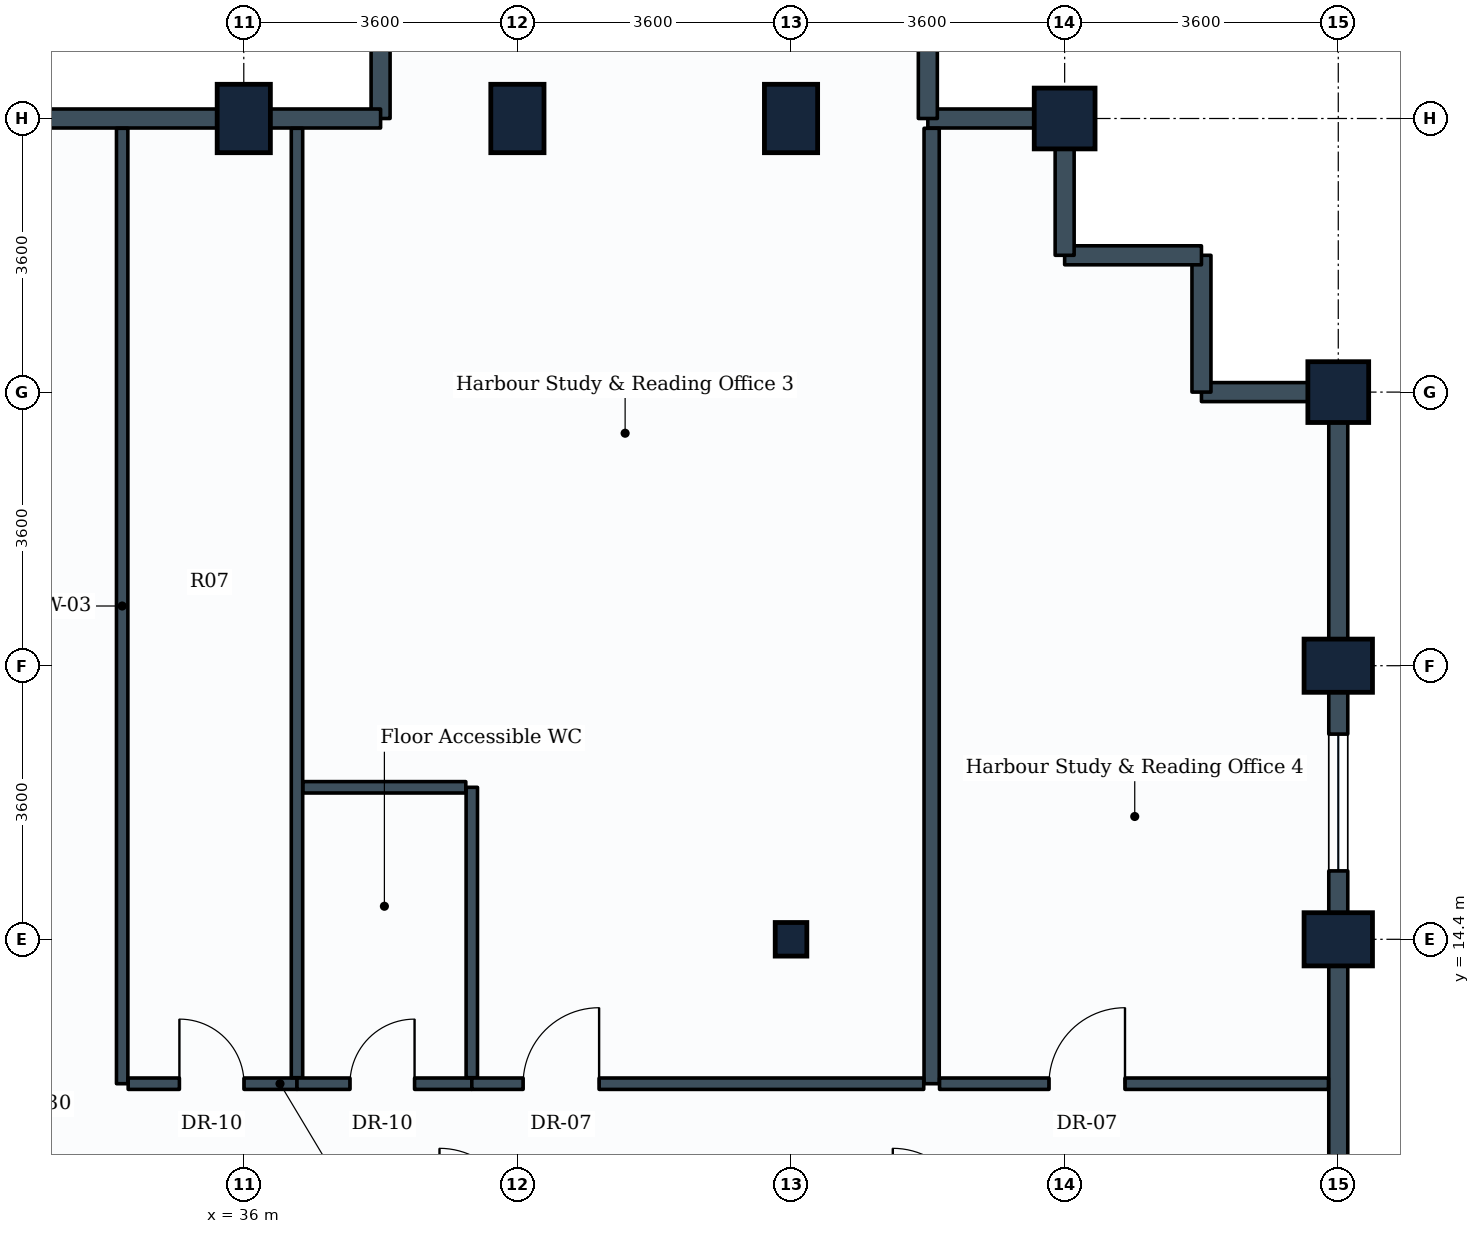
"""IFC4 building model, lengths in metres.
Left out: names, types, materials, properties, quantities, classifications, styles, units other than length and angle.
Written with IfcOpenShell. Run it as: python <this file> out.ifc"""

import sys

from ifc_helpers import new_model, si_unit, direction, frame, frame_2d, origin, origin_2d, place, context, subcontext, project, spatial, rectangle, i_section, extrude, element, fill, save


model = new_model("IFC4")
c1 = context("Model", 3, precision=1e-05, world=origin(), true_north=direction((0.0, 1.0)))
c2 = subcontext(c1, "Body", "Model", "MODEL_VIEW")
j1 = project(units=[si_unit("LENGTHUNIT", "METRE"), si_unit("PLANEANGLEUNIT", "RADIAN")], contexts=[c1])
p1 = place(None, origin())
s1 = spatial("IfcSite", under=j1, at=p1, CompositionType="ELEMENT")
p2 = place(p1, origin())
s2 = spatial("IfcBuilding", under=s1, at=p2, CompositionType="ELEMENT")
p3 = place(p2, frame((0.0, 0.0, 182.4)))
s3 = spatial("IfcBuildingStorey", under=s2, at=p3, CompositionType="ELEMENT", Elevation=182.4)
for number, where, z_axis, x_axis in (
    (1, (36.0, 25.2, 0.0), (0.0, 0.0, 1.0), (1.0, 0.0, 0.0)),
    (2, (39.6, 25.2, 0.0), (0.0, 0.0, 1.0), (1.0, 0.0, 0.0)),
):
    element("IfcColumn", number, at=place(p3, frame(where, z_axis=z_axis, x_axis=x_axis)), inside=s3, PredefinedType="COLUMN", context=c2, shape_type="SweptSolid", body=[
        extrude(rectangle(XDim=0.7, YDim=0.9, at=origin_2d()), origin(), (0.0, 0.0, 1.0), 3.8),
    ])
p4 = place(p3, frame((43.2, 14.4, 0.0), z_axis=(0.0, 0.0, 1.0), x_axis=(1.0, 0.0, 0.0)))
e3 = element("IfcColumn", 3, at=p4, inside=s3, PredefinedType="COLUMN", context=c2, shape_type="SweptSolid", body=[
    extrude(i_section(OverallWidth=0.416, OverallDepth=0.442, WebThickness=0.025, FlangeThickness=0.041, FilletRadius=0.015, at=origin_2d()), origin(), (0.0, 0.0, 1.0), 3.8),
])
p5 = place(p3, frame((43.2, 25.2, 0.0), z_axis=(0.0, 0.0, 1.0), x_axis=(1.0, 0.0, 0.0)))
e4 = element("IfcColumn", 4, at=p5, inside=s3, PredefinedType="COLUMN", context=c2, shape_type="SweptSolid", body=[
    extrude(rectangle(XDim=0.7, YDim=0.9, at=origin_2d()), origin(), (0.0, 0.0, 1.0), 3.8),
])
p6 = place(p3, frame((46.8, 25.2, 0.0), z_axis=(0.0, 0.0, 1.0), x_axis=(1.0, 0.0, 0.0)))
e5 = element("IfcColumn", 5, at=p6, inside=s3, PredefinedType="COLUMN", context=c2, shape_type="SweptSolid", body=[
    extrude(rectangle(XDim=0.8, YDim=0.8, at=origin_2d()), origin(), (0.0, 0.0, 1.0), 3.8),
])
for number, where, z_axis, x_axis in (
    (6, (50.4, 14.4, 0.0), (0.0, 0.0, 1.0), (0.0, 1.0, 0.0)),
    (7, (50.4, 18.0, 0.0), (0.0, 0.0, 1.0), (0.0, 1.0, 0.0)),
):
    element("IfcColumn", number, at=place(p3, frame(where, z_axis=z_axis, x_axis=x_axis)), inside=s3, PredefinedType="COLUMN", context=c2, shape_type="SweptSolid", body=[
        extrude(rectangle(XDim=0.7, YDim=0.9, at=origin_2d()), origin(), (0.0, 0.0, 1.0), 3.8),
    ])
p7 = place(p3, frame((50.4, 21.6, 0.0), z_axis=(0.0, 0.0, 1.0), x_axis=(0.0, 1.0, 0.0)))
e8 = element("IfcColumn", 8, at=p7, inside=s3, PredefinedType="COLUMN", context=c2, shape_type="SweptSolid", body=[
    extrude(rectangle(XDim=0.8, YDim=0.8, at=origin_2d()), origin(), (0.0, 0.0, 1.0), 3.8),
])
p8 = place(p3, frame((50.4, 14.4, 0.0), z_axis=(0.0, 0.0, 1.0), x_axis=(0.0, -1.0, 0.0)))
e9 = element("IfcWall", 9, at=p8, inside=s3, PredefinedType="STANDARD", context=c2, shape_type="SweptSolid", body=[
    extrude(rectangle(XDim=3.6, YDim=0.25, at=frame_2d((1.8, 0.0))), origin(), (0.0, 0.0, 1.0), 2.93),
])
p9 = place(p3, frame((50.4, 18.0, 0.0), z_axis=(0.0, 0.0, 1.0), x_axis=(0.0, -1.0, 0.0)))
e10 = element("IfcWall", 10, at=p9, inside=s3, PredefinedType="STANDARD", context=c2, shape_type="SweptSolid", body=[
    extrude(rectangle(XDim=3.6, YDim=0.25, at=frame_2d((1.8, 0.0))), origin(), (0.0, 0.0, 1.0), 2.93),
])
p10 = place(p9, frame((0.9, 0.0, 0.85)))
e11 = element("IfcOpeningElement", 11, at=p10, cuts=e10, PredefinedType="OPENING", context=c2, shape_type="SweptSolid", body=[
    extrude(rectangle(XDim=1.8, YDim=1.35, at=frame_2d((0.9, 0.675))), frame((0.0, 0.135, 0.0), z_axis=(0.0, -1.0, 0.0), x_axis=(1.0, 0.0, 0.0)), (0.0, 0.0, 1.0), 0.27),
])
p11 = place(p3, frame((50.4, 21.6, 0.0), z_axis=(0.0, 0.0, 1.0), x_axis=(0.0, -1.0, 0.0)))
e12 = element("IfcWall", 12, at=p11, inside=s3, PredefinedType="STANDARD", context=c2, shape_type="SweptSolid", body=[
    extrude(rectangle(XDim=3.6, YDim=0.25, at=frame_2d((1.8, 0.0))), origin(), (0.0, 0.0, 1.0), 2.93),
])
p12 = place(p3, frame((48.6, 21.6, 0.0), z_axis=(0.0, 0.0, 1.0), x_axis=(1.0, 0.0, 0.0)))
e13 = element("IfcWall", 13, at=p12, inside=s3, PredefinedType="STANDARD", context=c2, shape_type="SweptSolid", body=[
    extrude(rectangle(XDim=1.8, YDim=0.25, at=frame_2d((0.9, 0.0))), origin(), (0.0, 0.0, 1.0), 2.93),
])
p13 = place(p3, frame((48.6, 23.4, 0.0), z_axis=(0.0, 0.0, 1.0), x_axis=(0.0, -1.0, 0.0)))
e14 = element("IfcWall", 14, at=p13, inside=s3, PredefinedType="STANDARD", context=c2, shape_type="SweptSolid", body=[
    extrude(rectangle(XDim=1.8, YDim=0.25, at=frame_2d((0.9, 0.0))), origin(), (0.0, 0.0, 1.0), 3.535),
])
p14 = place(p3, frame((46.8, 23.4, 0.0), z_axis=(0.0, 0.0, 1.0), x_axis=(1.0, 0.0, 0.0)))
e15 = element("IfcWall", 15, at=p14, inside=s3, PredefinedType="STANDARD", context=c2, shape_type="SweptSolid", body=[
    extrude(rectangle(XDim=1.8, YDim=0.25, at=frame_2d((0.9, 0.0))), origin(), (0.0, 0.0, 1.0), 3.535),
])
for number, where, z_axis, x_axis in (
    (16, (46.8, 25.2, 0.0), (0.0, 0.0, 1.0), (0.0, -1.0, 0.0)),
    (17, (45.0, 25.2, 0.0), (0.0, 0.0, 1.0), (1.0, 0.0, 0.0)),
):
    element("IfcWall", number, at=place(p3, frame(where, z_axis=z_axis, x_axis=x_axis)), inside=s3, PredefinedType="STANDARD", context=c2, shape_type="SweptSolid", body=[
        extrude(rectangle(XDim=1.8, YDim=0.25, at=frame_2d((0.9, 0.0))), origin(), (0.0, 0.0, 1.0), 2.93),
    ])
for number, where, z_axis, x_axis in (
    (18, (45.0, 27.3, 0.0), (0.0, 0.0, 1.0), (0.0, -1.0, 0.0)),
    (19, (37.8, 27.3, 0.0), (0.0, 0.0, 1.0), (0.0, -1.0, 0.0)),
):
    element("IfcWall", number, at=place(p3, frame(where, z_axis=z_axis, x_axis=x_axis)), inside=s3, PredefinedType="STANDARD", context=c2, shape_type="SweptSolid", body=[
        extrude(rectangle(XDim=2.1, YDim=0.25, at=frame_2d((1.05, 0.0))), origin(), (0.0, 0.0, 1.0), 2.93),
    ])
p15 = place(p3, frame((36.0, 25.2, 0.0), z_axis=(0.0, 0.0, 1.0), x_axis=(1.0, 0.0, 0.0)))
e20 = element("IfcWall", 20, at=p15, inside=s3, PredefinedType="STANDARD", context=c2, shape_type="SweptSolid", body=[
    extrude(rectangle(XDim=1.8, YDim=0.25, at=frame_2d((0.9, 0.0))), origin(), (0.0, 0.0, 1.0), 2.93),
])
p16 = place(p3, frame((32.4, 25.2, 0.0), z_axis=(0.0, 0.0, 1.0), x_axis=(1.0, 0.0, 0.0)))
e21 = element("IfcWall", 21, at=p16, inside=s3, PredefinedType="STANDARD", context=c2, shape_type="SweptSolid", body=[
    extrude(rectangle(XDim=3.6, YDim=0.25, at=frame_2d((1.8, 0.0))), origin(), (0.0, 0.0, 1.0), 2.93),
])
p17 = place(p3, frame((34.4, 12.5, 0.0), z_axis=(0.0, 0.0, 1.0), x_axis=(0.0, 1.0, 0.0)))
e22 = element("IfcWall", 22, at=p17, inside=s3, PredefinedType="PARTITIONING", context=c2, shape_type="SweptSolid", body=[
    extrude(rectangle(XDim=12.571, YDim=0.15, at=frame_2d((6.286, 0.0))), origin(), (0.0, 0.0, 1.0), 2.93),
])
p18 = place(p3, frame((34.479, 12.5, 0.0), z_axis=(0.0, 0.0, 1.0), x_axis=(1.0, 0.0, 0.0)))
e23 = element("IfcWall", 23, at=p18, inside=s3, PredefinedType="PARTITIONING", context=c2, shape_type="SweptSolid", body=[
    extrude(rectangle(XDim=2.221, YDim=0.15, at=frame_2d((1.11, 0.0))), origin(), (0.0, 0.0, 1.0), 3.22),
])
p19 = place(p18, frame((0.674, 0.0, 0.0)))
e24 = element("IfcOpeningElement", 24, at=p19, cuts=e23, PredefinedType="OPENING", context=c2, shape_type="SweptSolid", body=[
    extrude(rectangle(XDim=0.85, YDim=2.1, at=frame_2d((0.425, 1.05))), frame((0.0, 0.085, 0.0), z_axis=(0.0, -1.0, 0.0), x_axis=(1.0, 0.0, 0.0)), (0.0, 0.0, 1.0), 0.17),
])
p20 = place(p3, frame((36.7, 12.579, 0.0), z_axis=(0.0, 0.0, 1.0), x_axis=(0.0, 1.0, 0.0)))
e25 = element("IfcWall", 25, at=p20, inside=s3, PredefinedType="PARTITIONING", context=c2, shape_type="SweptSolid", body=[
    extrude(rectangle(XDim=12.492, YDim=0.15, at=frame_2d((6.246, 0.0))), origin(), (0.0, 0.0, 1.0), 2.93),
])
p21 = place(p3, frame((36.7, 12.5, 0.0), z_axis=(0.0, 0.0, 1.0), x_axis=(1.0, 0.0, 0.0)))
e26 = element("IfcWall", 26, at=p21, inside=s3, PredefinedType="PARTITIONING", context=c2, shape_type="SweptSolid", body=[
    extrude(rectangle(XDim=2.3, YDim=0.15, at=frame_2d((1.15, 0.0))), origin(), (0.0, 0.0, 1.0), 3.535),
])
p22 = place(p21, frame((0.697, 0.0, 0.0)))
e27 = element("IfcOpeningElement", 27, at=p22, cuts=e26, PredefinedType="OPENING", context=c2, shape_type="SweptSolid", body=[
    extrude(rectangle(XDim=0.85, YDim=2.1, at=frame_2d((0.425, 1.05))), frame((0.0, 0.085, 0.0), z_axis=(0.0, -1.0, 0.0), x_axis=(1.0, 0.0, 0.0)), (0.0, 0.0, 1.0), 0.17),
])
p23 = place(p3, frame((39.0, 12.579, 0.0), z_axis=(0.0, 0.0, 1.0), x_axis=(0.0, 1.0, 0.0)))
e28 = element("IfcWall", 28, at=p23, inside=s3, PredefinedType="PARTITIONING", context=c2, shape_type="SweptSolid", body=[
    extrude(rectangle(XDim=3.821, YDim=0.15, at=frame_2d((1.91, 0.0))), origin(), (0.0, 0.0, 1.0), 3.17),
])
p24 = place(p3, frame((36.779, 16.4, 0.0), z_axis=(0.0, 0.0, 1.0), x_axis=(1.0, 0.0, 0.0)))
e29 = element("IfcWall", 29, at=p24, inside=s3, PredefinedType="PARTITIONING", context=c2, shape_type="SweptSolid", body=[
    extrude(rectangle(XDim=2.142, YDim=0.15, at=frame_2d((1.071, 0.0))), origin(), (0.0, 0.0, 1.0), 3.535),
])
p25 = place(p3, frame((45.05, 12.5, 0.0), z_axis=(0.0, 0.0, 1.0), x_axis=(0.0, 1.0, 0.0)))
e30 = element("IfcWall", 30, at=p25, inside=s3, PredefinedType="PARTITIONING", context=c2, shape_type="SweptSolid", body=[
    extrude(rectangle(XDim=12.571, YDim=0.2, at=frame_2d((6.286, 0.0))), origin(), (0.0, 0.0, 1.0), 2.93),
])
p26 = place(p3, frame((39.0, 12.5, 0.0), z_axis=(0.0, 0.0, 1.0), x_axis=(1.0, 0.0, 0.0)))
e31 = element("IfcWall", 31, at=p26, inside=s3, PredefinedType="PARTITIONING", context=c2, shape_type="SweptSolid", body=[
    extrude(rectangle(XDim=5.946, YDim=0.15, at=frame_2d((2.973, 0.0))), origin(), (0.0, 0.0, 1.0), 3.17),
])
p27 = place(p26, frame((0.675, 0.0, 0.0)))
e32 = element("IfcOpeningElement", 32, at=p27, cuts=e31, PredefinedType="OPENING", context=c2, shape_type="SweptSolid", body=[
    extrude(rectangle(XDim=1.0, YDim=2.1, at=frame_2d((0.5, 1.05))), frame((0.0, 0.085, 0.0), z_axis=(0.0, -1.0, 0.0), x_axis=(1.0, 0.0, 0.0)), (0.0, 0.0, 1.0), 0.17),
])
p28 = place(p3, frame((45.154, 12.5, 0.0), z_axis=(0.0, 0.0, 1.0), x_axis=(1.0, 0.0, 0.0)))
e33 = element("IfcWall", 33, at=p28, inside=s3, PredefinedType="PARTITIONING", context=c2, shape_type="SweptSolid", body=[
    extrude(rectangle(XDim=5.117, YDim=0.15, at=frame_2d((2.559, 0.0))), origin(), (0.0, 0.0, 1.0), 2.93),
])
p29 = place(p28, frame((1.44, 0.0, 0.0)))
e34 = element("IfcOpeningElement", 34, at=p29, cuts=e33, PredefinedType="OPENING", context=c2, shape_type="SweptSolid", body=[
    extrude(rectangle(XDim=1.0, YDim=2.1, at=frame_2d((0.5, 1.05))), frame((0.0, 0.085, 0.0), z_axis=(0.0, -1.0, 0.0), x_axis=(1.0, 0.0, 0.0)), (0.0, 0.0, 1.0), 0.17),
])
p30 = place(p10, origin())
e35 = element("IfcWindow", 35, at=p30, inside=s3, PartitioningType="SINGLE_PANEL", PredefinedType="WINDOW", context=c2, shape_type="SweptSolid", body=[
    extrude(rectangle(XDim=1.8, YDim=1.35, at=frame_2d((0.9, 0.675))), frame((0.0, 0.03, 0.0), z_axis=(0.0, -1.0, 0.0), x_axis=(1.0, 0.0, 0.0)), (0.0, 0.0, 1.0), 0.06),
])
fill(e11, e35)
p31 = place(p19, origin())
e36 = element("IfcDoor", 36, at=p31, inside=s3, OperationType="SINGLE_SWING_LEFT", PredefinedType="DOOR", context=c2, shape_type="SweptSolid", body=[
    extrude(rectangle(XDim=0.85, YDim=2.1, at=frame_2d((0.425, 1.05))), frame((0.0, 0.025, 0.0), z_axis=(0.0, -1.0, 0.0), x_axis=(1.0, 0.0, 0.0)), (0.0, 0.0, 1.0), 0.05),
])
fill(e24, e36)
p32 = place(p22, origin())
e37 = element("IfcDoor", 37, at=p32, inside=s3, OperationType="SINGLE_SWING_RIGHT", PredefinedType="DOOR", context=c2, shape_type="SweptSolid", body=[
    extrude(rectangle(XDim=0.85, YDim=2.1, at=frame_2d((0.425, 1.05))), frame((0.0, 0.025, 0.0), z_axis=(0.0, -1.0, 0.0), x_axis=(1.0, 0.0, 0.0)), (0.0, 0.0, 1.0), 0.05),
])
fill(e27, e37)
p33 = place(p27, origin())
e38 = element("IfcDoor", 38, at=p33, inside=s3, OperationType="SINGLE_SWING_RIGHT", PredefinedType="DOOR", context=c2, shape_type="SweptSolid", body=[
    extrude(rectangle(XDim=1.0, YDim=2.1, at=frame_2d((0.5, 1.05))), frame((0.0, 0.025, 0.0), z_axis=(0.0, -1.0, 0.0), x_axis=(1.0, 0.0, 0.0)), (0.0, 0.0, 1.0), 0.05),
])
fill(e32, e38)
p34 = place(p29, origin())
e39 = element("IfcDoor", 39, at=p34, inside=s3, OperationType="SINGLE_SWING_RIGHT", PredefinedType="DOOR", context=c2, shape_type="SweptSolid", body=[
    extrude(rectangle(XDim=1.0, YDim=2.1, at=frame_2d((0.5, 1.05))), frame((0.0, 0.025, 0.0), z_axis=(0.0, -1.0, 0.0), x_axis=(1.0, 0.0, 0.0)), (0.0, 0.0, 1.0), 0.05),
])
fill(e34, e39)
save(model, sys.argv[1])
